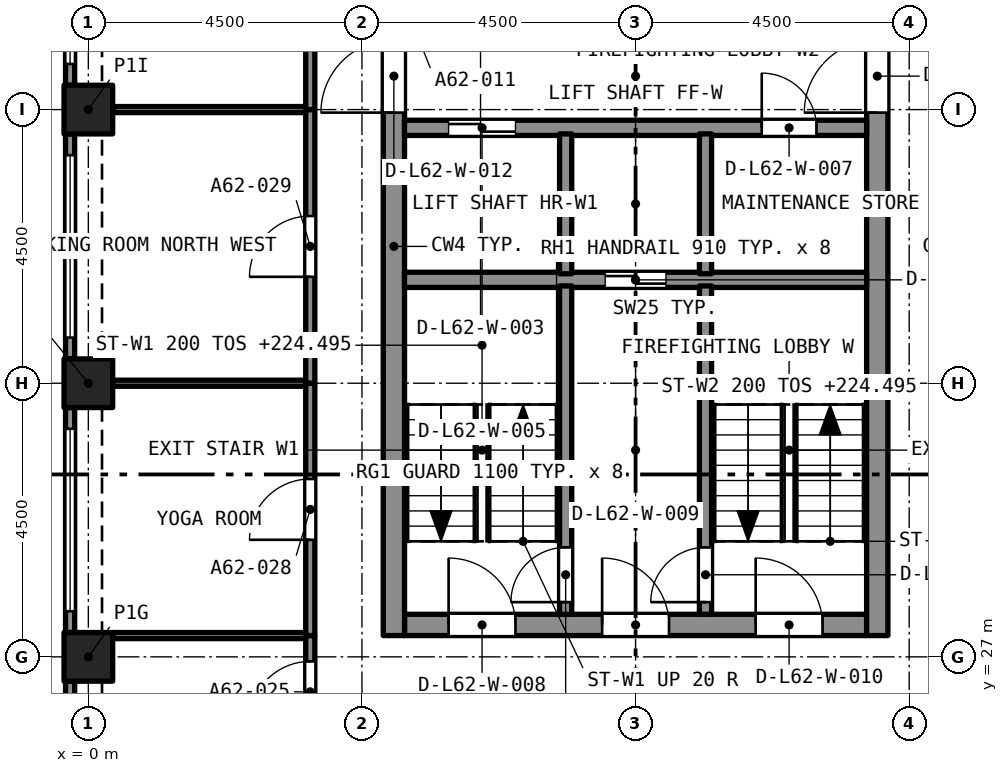
"""IFC4 building model, lengths in metres.
Left out: names, types, materials, properties, quantities, classifications, styles, units other than length and angle.
Written with IfcOpenShell. Run it as: python <this file> out.ifc"""

import sys

from ifc_helpers import new_model, si_unit, direction, frame, frame_2d, origin, origin_2d, place, context, subcontext, project, spatial, rectangle, extrude, element, fill, save


model = new_model("IFC4")
c1 = context("Model", 3, precision=1e-05, world=origin(), true_north=direction((0.0, 1.0)))
c2 = subcontext(c1, "Body", "Model", "MODEL_VIEW")
j1 = project(units=[si_unit("LENGTHUNIT", "METRE"), si_unit("PLANEANGLEUNIT", "RADIAN")], contexts=[c1])
p1 = place(None, origin())
s1 = spatial("IfcSite", under=j1, at=p1, CompositionType="ELEMENT")
p2 = place(p1, origin())
s2 = spatial("IfcBuilding", under=s1, at=p2, CompositionType="ELEMENT")
p3 = place(p2, frame((0.0, 0.0, 222.895)))
s3 = spatial("IfcBuildingStorey", under=s2, at=p3, CompositionType="ELEMENT", Elevation=222.895)
for number, where, z_axis, x_axis in (
    (1, (0.0, 27.0, 0.0), (0.0, 0.0, 1.0), (1.0, 0.0, 0.0)),
    (2, (0.0, 31.5, 0.0), (0.0, 0.0, 1.0), (1.0, 0.0, 0.0)),
    (3, (0.0, 36.0, 0.0), (0.0, 0.0, 1.0), (1.0, 0.0, 0.0)),
):
    element("IfcColumn", number, at=place(p3, frame(where, z_axis=z_axis, x_axis=x_axis)), inside=s3, PredefinedType="COLUMN", context=c2, shape_type="SweptSolid", body=[
        extrude(rectangle(XDim=0.8, YDim=0.8, at=origin_2d()), origin(), (0.0, 0.0, 1.0), 3.2),
    ])
p4 = place(p3, frame((5.2, 27.525, 0.0), z_axis=(0.0, 0.0, 1.0), x_axis=(1.0, 0.0, 0.0)))
e4 = element("IfcWall", 4, at=p4, inside=s3, PredefinedType="SOLIDWALL", context=c2, shape_type="SweptSolid", body=[
    extrude(rectangle(XDim=7.6, YDim=0.35, at=frame_2d((3.8, 0.0))), origin(), (0.0, 0.0, 1.0), 3.2),
])
p5 = place(p4, frame((0.725, 0.0, 0.0)))
e5 = element("IfcOpeningElement", 5, at=p5, cuts=e4, PredefinedType="OPENING", context=c2, shape_type="SweptSolid", body=[
    extrude(rectangle(XDim=1.1, YDim=2.1, at=frame_2d((0.55, 1.05))), frame((0.0, 0.185, 0.0), z_axis=(0.0, -1.0, 0.0), x_axis=(1.0, 0.0, 0.0)), (0.0, 0.0, 1.0), 0.37),
])
p6 = place(p4, frame((3.25, 0.0, 0.0)))
e6 = element("IfcOpeningElement", 6, at=p6, cuts=e4, PredefinedType="OPENING", context=c2, shape_type="SweptSolid", body=[
    extrude(rectangle(XDim=1.1, YDim=2.1, at=frame_2d((0.55, 1.05))), frame((0.0, 0.185, 0.0), z_axis=(0.0, -1.0, 0.0), x_axis=(1.0, 0.0, 0.0)), (0.0, 0.0, 1.0), 0.37),
])
p7 = place(p4, frame((5.775, 0.0, 0.0)))
e7 = element("IfcOpeningElement", 7, at=p7, cuts=e4, PredefinedType="OPENING", context=c2, shape_type="SweptSolid", body=[
    extrude(rectangle(XDim=1.1, YDim=2.1, at=frame_2d((0.55, 1.05))), frame((0.0, 0.185, 0.0), z_axis=(0.0, -1.0, 0.0), x_axis=(1.0, 0.0, 0.0)), (0.0, 0.0, 1.0), 0.37),
])
p8 = place(p3, frame((5.025, 27.35, 0.0), z_axis=(0.0, 0.0, 1.0), x_axis=(0.0, 1.0, 0.0)))
e8 = element("IfcWall", 8, at=p8, inside=s3, PredefinedType="SOLIDWALL", context=c2, shape_type="SweptSolid", body=[
    extrude(rectangle(XDim=12.8, YDim=0.35, at=frame_2d((6.4, 0.0))), origin(), (0.0, 0.0, 1.0), 3.2),
])
p9 = place(p8, frame((8.6, 0.0, 0.0)))
e9 = element("IfcOpeningElement", 9, at=p9, cuts=e8, PredefinedType="OPENING", context=c2, shape_type="SweptSolid", body=[
    extrude(rectangle(XDim=1.2, YDim=2.1, at=frame_2d((0.6, 1.05))), frame((0.0, 0.185, 0.0), z_axis=(0.0, -1.0, 0.0), x_axis=(1.0, 0.0, 0.0)), (0.0, 0.0, 1.0), 0.37),
])
p10 = place(p3, frame((12.975, 27.35, 0.0), z_axis=(0.0, 0.0, 1.0), x_axis=(0.0, 1.0, 0.0)))
e10 = element("IfcWall", 10, at=p10, inside=s3, PredefinedType="SOLIDWALL", context=c2, shape_type="SweptSolid", body=[
    extrude(rectangle(XDim=12.8, YDim=0.35, at=frame_2d((6.4, 0.0))), origin(), (0.0, 0.0, 1.0), 3.2),
])
p11 = place(p10, frame((10.75, 0.0, 0.0)))
e11 = element("IfcOpeningElement", 11, at=p11, cuts=e10, PredefinedType="OPENING", context=c2, shape_type="SweptSolid", body=[
    extrude(rectangle(XDim=1.1, YDim=2.1, at=frame_2d((0.55, 1.05))), frame((0.0, 0.185, 0.0), z_axis=(0.0, -1.0, 0.0), x_axis=(1.0, 0.0, 0.0)), (0.0, 0.0, 1.0), 0.37),
])
p12 = place(p10, frame((8.6, 0.0, 0.0)))
e12 = element("IfcOpeningElement", 12, at=p12, cuts=e10, PredefinedType="OPENING", context=c2, shape_type="SweptSolid", body=[
    extrude(rectangle(XDim=1.2, YDim=2.1, at=frame_2d((0.6, 1.05))), frame((0.0, 0.185, 0.0), z_axis=(0.0, -1.0, 0.0), x_axis=(1.0, 0.0, 0.0)), (0.0, 0.0, 1.0), 0.37),
])
p13 = place(p3, frame((-0.3, 36.4, 0.0), z_axis=(0.0, 0.0, 1.0), x_axis=(0.0, 1.0, 0.0)))
e13 = element("IfcWall", 13, at=p13, inside=s3, PredefinedType="SOLIDWALL", context=c2, shape_type="SweptSolid", body=[
    extrude(rectangle(XDim=3.7, YDim=0.15, at=frame_2d((1.85, 0.0))), origin(), (0.0, 0.0, 1.0), 3.2),
])
p14 = place(p13, frame((0.35, 0.0, 0.45)))
e14 = element("IfcOpeningElement", 14, at=p14, cuts=e13, PredefinedType="OPENING", context=c2, shape_type="SweptSolid", body=[
    extrude(rectangle(XDim=3.0, YDim=1.95, at=frame_2d((1.5, 0.975))), frame((0.0, 0.085, 0.0), z_axis=(0.0, -1.0, 0.0), x_axis=(1.0, 0.0, 0.0)), (0.0, 0.0, 1.0), 0.17),
])
p15 = place(p3, frame((-0.3, 31.9, 0.0), z_axis=(0.0, 0.0, 1.0), x_axis=(0.0, 1.0, 0.0)))
e15 = element("IfcWall", 15, at=p15, inside=s3, PredefinedType="SOLIDWALL", context=c2, shape_type="SweptSolid", body=[
    extrude(rectangle(XDim=3.7, YDim=0.15, at=frame_2d((1.85, 0.0))), origin(), (0.0, 0.0, 1.0), 3.2),
])
p16 = place(p15, frame((0.35, 0.0, 0.45)))
e16 = element("IfcOpeningElement", 16, at=p16, cuts=e15, PredefinedType="OPENING", context=c2, shape_type="SweptSolid", body=[
    extrude(rectangle(XDim=3.0, YDim=1.95, at=frame_2d((1.5, 0.975))), frame((0.0, 0.085, 0.0), z_axis=(0.0, -1.0, 0.0), x_axis=(1.0, 0.0, 0.0)), (0.0, 0.0, 1.0), 0.17),
])
p17 = place(p3, frame((-0.3, 27.4, 0.0), z_axis=(0.0, 0.0, 1.0), x_axis=(0.0, 1.0, 0.0)))
e17 = element("IfcWall", 17, at=p17, inside=s3, PredefinedType="SOLIDWALL", context=c2, shape_type="SweptSolid", body=[
    extrude(rectangle(XDim=3.7, YDim=0.15, at=frame_2d((1.85, 0.0))), origin(), (0.0, 0.0, 1.0), 3.2),
])
p18 = place(p17, frame((0.35, 0.0, 0.45)))
e18 = element("IfcOpeningElement", 18, at=p18, cuts=e17, PredefinedType="OPENING", context=c2, shape_type="SweptSolid", body=[
    extrude(rectangle(XDim=3.0, YDim=1.95, at=frame_2d((1.5, 0.975))), frame((0.0, 0.085, 0.0), z_axis=(0.0, -1.0, 0.0), x_axis=(1.0, 0.0, 0.0)), (0.0, 0.0, 1.0), 0.17),
])
p19 = place(p3, frame((-0.3, 22.9, 0.0), z_axis=(0.0, 0.0, 1.0), x_axis=(0.0, 1.0, 0.0)))
e19 = element("IfcWall", 19, at=p19, inside=s3, PredefinedType="SOLIDWALL", context=c2, shape_type="SweptSolid", body=[
    extrude(rectangle(XDim=3.7, YDim=0.15, at=frame_2d((1.85, 0.0))), origin(), (0.0, 0.0, 1.0), 3.2),
])
p20 = place(p19, frame((0.35, 0.0, 0.45)))
e20 = element("IfcOpeningElement", 20, at=p20, cuts=e19, PredefinedType="OPENING", context=c2, shape_type="SweptSolid", body=[
    extrude(rectangle(XDim=3.0, YDim=1.95, at=frame_2d((1.5, 0.975))), frame((0.0, 0.085, 0.0), z_axis=(0.0, -1.0, 0.0), x_axis=(1.0, 0.0, 0.0)), (0.0, 0.0, 1.0), 0.17),
])
p21 = place(p3, frame((3.65, 25.425, 0.0), z_axis=(0.0, 0.0, 1.0), x_axis=(0.0, 1.0, 0.0)))
e21 = element("IfcWall", 21, at=p21, inside=s3, PredefinedType="PARTITIONING", context=c2, shape_type="SweptSolid", body=[
    extrude(rectangle(XDim=1.925, YDim=0.15, at=frame_2d((0.962, 0.0))), origin(), (0.0, 0.0, 1.0), 2.9),
])
p22 = place(p21, frame((0.5, 0.0, 0.0)))
e22 = element("IfcOpeningElement", 22, at=p22, cuts=e21, PredefinedType="OPENING", context=c2, shape_type="SweptSolid", body=[
    extrude(rectangle(XDim=1.0, YDim=2.1, at=frame_2d((0.5, 1.05))), frame((0.0, 0.085, 0.0), z_axis=(0.0, -1.0, 0.0), x_axis=(1.0, 0.0, 0.0)), (0.0, 0.0, 1.0), 0.17),
])
p23 = place(p3, frame((3.65, 27.35, 0.0), z_axis=(0.0, 0.0, 1.0), x_axis=(0.0, 1.0, 0.0)))
e23 = element("IfcWall", 23, at=p23, inside=s3, PredefinedType="PARTITIONING", context=c2, shape_type="SweptSolid", body=[
    extrude(rectangle(XDim=4.15, YDim=0.15, at=frame_2d((2.075, 0.0))), origin(), (0.0, 0.0, 1.0), 2.9),
])
p24 = place(p23, frame((1.575, 0.0, 0.0)))
e24 = element("IfcOpeningElement", 24, at=p24, cuts=e23, PredefinedType="OPENING", context=c2, shape_type="SweptSolid", body=[
    extrude(rectangle(XDim=1.0, YDim=2.1, at=frame_2d((0.5, 1.05))), frame((0.0, 0.085, 0.0), z_axis=(0.0, -1.0, 0.0), x_axis=(1.0, 0.0, 0.0)), (0.0, 0.0, 1.0), 0.17),
])
p25 = place(p3, frame((3.65, 31.5, 0.0), z_axis=(0.0, 0.0, 1.0), x_axis=(0.0, 1.0, 0.0)))
e25 = element("IfcWall", 25, at=p25, inside=s3, PredefinedType="PARTITIONING", context=c2, shape_type="SweptSolid", body=[
    extrude(rectangle(XDim=4.5, YDim=0.15, at=frame_2d((2.25, 0.0))), origin(), (0.0, 0.0, 1.0), 2.9),
])
p26 = place(p25, frame((1.75, 0.0, 0.0)))
e26 = element("IfcOpeningElement", 26, at=p26, cuts=e25, PredefinedType="OPENING", context=c2, shape_type="SweptSolid", body=[
    extrude(rectangle(XDim=1.0, YDim=2.1, at=frame_2d((0.5, 1.05))), frame((0.0, 0.085, 0.0), z_axis=(0.0, -1.0, 0.0), x_axis=(1.0, 0.0, 0.0)), (0.0, 0.0, 1.0), 0.17),
])
p27 = place(p3, frame((3.65, 36.0, 0.0), z_axis=(0.0, 0.0, 1.0), x_axis=(0.0, 1.0, 0.0)))
e27 = element("IfcWall", 27, at=p27, inside=s3, PredefinedType="PARTITIONING", context=c2, shape_type="SweptSolid", body=[
    extrude(rectangle(XDim=4.025, YDim=0.15, at=frame_2d((2.012, 0.0))), origin(), (0.0, 0.0, 1.0), 2.9),
])
p28 = place(p27, frame((1.575, 0.0, 0.0)))
e28 = element("IfcOpeningElement", 28, at=p28, cuts=e27, PredefinedType="OPENING", context=c2, shape_type="SweptSolid", body=[
    extrude(rectangle(XDim=1.0, YDim=2.1, at=frame_2d((0.5, 1.05))), frame((0.0, 0.085, 0.0), z_axis=(0.0, -1.0, 0.0), x_axis=(1.0, 0.0, 0.0)), (0.0, 0.0, 1.0), 0.17),
])
for number, where, z_axis, x_axis in (
    (29, (0.4, 27.35, 0.0), (0.0, 0.0, 1.0), (1.0, 0.0, 0.0)),
    (30, (0.4, 31.5, 0.0), (0.0, 0.0, 1.0), (1.0, 0.0, 0.0)),
    (31, (0.4, 36.0, 0.0), (0.0, 0.0, 1.0), (1.0, 0.0, 0.0)),
):
    element("IfcWall", number, at=place(p3, frame(where, z_axis=z_axis, x_axis=x_axis)), inside=s3, PredefinedType="PARTITIONING", context=c2, shape_type="SweptSolid", body=[
        extrude(rectangle(XDim=3.175, YDim=0.1, at=frame_2d((1.587, 0.0))), origin(), (0.0, 0.0, 1.0), 2.9),
    ])
p29 = place(p3, frame((5.2, 33.2, 0.0), z_axis=(0.0, 0.0, 1.0), x_axis=(1.0, 0.0, 0.0)))
e32 = element("IfcWall", 32, at=p29, inside=s3, PredefinedType="SOLIDWALL", context=c2, shape_type="SweptSolid", body=[
    extrude(rectangle(XDim=7.6, YDim=0.25, at=frame_2d((3.8, 0.0))), origin(), (0.0, 0.0, 1.0), 2.9),
])
p30 = place(p29, frame((3.3, 0.0, 0.0)))
e33 = element("IfcOpeningElement", 33, at=p30, cuts=e32, PredefinedType="OPENING", context=c2, shape_type="SweptSolid", body=[
    extrude(rectangle(XDim=1.0, YDim=2.1, at=frame_2d((0.5, 1.05))), frame((0.0, 0.135, 0.0), z_axis=(0.0, -1.0, 0.0), x_axis=(1.0, 0.0, 0.0)), (0.0, 0.0, 1.0), 0.27),
])
p31 = place(p3, frame((5.2, 35.7, 0.0), z_axis=(0.0, 0.0, 1.0), x_axis=(1.0, 0.0, 0.0)))
e34 = element("IfcWall", 34, at=p31, inside=s3, PredefinedType="SOLIDWALL", context=c2, shape_type="SweptSolid", body=[
    extrude(rectangle(XDim=7.6, YDim=0.25, at=frame_2d((3.8, 0.0))), origin(), (0.0, 0.0, 1.0), 2.9),
])
p32 = place(p31, frame((0.725, 0.0, 0.0)))
e35 = element("IfcOpeningElement", 35, at=p32, cuts=e34, PredefinedType="OPENING", context=c2, shape_type="SweptSolid", body=[
    extrude(rectangle(XDim=1.1, YDim=2.4, at=frame_2d((0.55, 1.2))), frame((0.0, 0.135, 0.0), z_axis=(0.0, -1.0, 0.0), x_axis=(1.0, 0.0, 0.0)), (0.0, 0.0, 1.0), 0.27),
])
p33 = place(p31, frame((5.875, 0.0, 0.0)))
e36 = element("IfcOpeningElement", 36, at=p33, cuts=e34, PredefinedType="OPENING", context=c2, shape_type="SweptSolid", body=[
    extrude(rectangle(XDim=0.9, YDim=2.1, at=frame_2d((0.45, 1.05))), frame((0.0, 0.135, 0.0), z_axis=(0.0, -1.0, 0.0), x_axis=(1.0, 0.0, 0.0)), (0.0, 0.0, 1.0), 0.27),
])
p34 = place(p3, frame((7.85, 27.7, 0.0), z_axis=(0.0, 0.0, 1.0), x_axis=(0.0, 1.0, 0.0)))
e37 = element("IfcWall", 37, at=p34, inside=s3, PredefinedType="SOLIDWALL", context=c2, shape_type="SweptSolid", body=[
    extrude(rectangle(XDim=5.4, YDim=0.2, at=frame_2d((2.7, 0.0))), origin(), (0.0, 0.0, 1.0), 2.9),
])
p35 = place(p34, frame((0.2, 0.0, 0.0)))
e38 = element("IfcOpeningElement", 38, at=p35, cuts=e37, PredefinedType="OPENING", context=c2, shape_type="SweptSolid", body=[
    extrude(rectangle(XDim=0.9, YDim=2.1, at=frame_2d((0.45, 1.05))), frame((0.0, 0.11, 0.0), z_axis=(0.0, -1.0, 0.0), x_axis=(1.0, 0.0, 0.0)), (0.0, 0.0, 1.0), 0.22),
])
p36 = place(p3, frame((10.15, 27.7, 0.0), z_axis=(0.0, 0.0, 1.0), x_axis=(0.0, 1.0, 0.0)))
e39 = element("IfcWall", 39, at=p36, inside=s3, PredefinedType="SOLIDWALL", context=c2, shape_type="SweptSolid", body=[
    extrude(rectangle(XDim=5.4, YDim=0.2, at=frame_2d((2.7, 0.0))), origin(), (0.0, 0.0, 1.0), 2.9),
])
p37 = place(p36, frame((0.2, 0.0, 0.0)))
e40 = element("IfcOpeningElement", 40, at=p37, cuts=e39, PredefinedType="OPENING", context=c2, shape_type="SweptSolid", body=[
    extrude(rectangle(XDim=0.9, YDim=2.1, at=frame_2d((0.45, 1.05))), frame((0.0, 0.11, 0.0), z_axis=(0.0, -1.0, 0.0), x_axis=(1.0, 0.0, 0.0)), (0.0, 0.0, 1.0), 0.22),
])
for number, where, z_axis, x_axis in (
    (41, (7.85, 33.3, 0.0), (0.0, 0.0, 1.0), (0.0, 1.0, 0.0)),
    (42, (10.15, 33.3, 0.0), (0.0, 0.0, 1.0), (0.0, 1.0, 0.0)),
):
    element("IfcWall", number, at=place(p3, frame(where, z_axis=z_axis, x_axis=x_axis)), inside=s3, PredefinedType="SOLIDWALL", context=c2, shape_type="SweptSolid", body=[
        extrude(rectangle(XDim=2.3, YDim=0.2, at=frame_2d((1.15, 0.0))), origin(), (0.0, 0.0, 1.0), 2.9),
    ])
p38 = place(p14, origin())
e43 = element("IfcWindow", 43, at=p38, inside=s3, PartitioningType="SINGLE_PANEL", PredefinedType="WINDOW", context=c2, shape_type="SweptSolid", body=[
    extrude(rectangle(XDim=3.0, YDim=1.95, at=frame_2d((1.5, 0.975))), frame((0.0, 0.03, 0.0), z_axis=(0.0, -1.0, 0.0), x_axis=(1.0, 0.0, 0.0)), (0.0, 0.0, 1.0), 0.06),
])
fill(e14, e43)
p39 = place(p16, origin())
e44 = element("IfcWindow", 44, at=p39, inside=s3, PartitioningType="SINGLE_PANEL", PredefinedType="WINDOW", context=c2, shape_type="SweptSolid", body=[
    extrude(rectangle(XDim=3.0, YDim=1.95, at=frame_2d((1.5, 0.975))), frame((0.0, 0.03, 0.0), z_axis=(0.0, -1.0, 0.0), x_axis=(1.0, 0.0, 0.0)), (0.0, 0.0, 1.0), 0.06),
])
fill(e16, e44)
p40 = place(p18, origin())
e45 = element("IfcWindow", 45, at=p40, inside=s3, PartitioningType="SINGLE_PANEL", PredefinedType="WINDOW", context=c2, shape_type="SweptSolid", body=[
    extrude(rectangle(XDim=3.0, YDim=1.95, at=frame_2d((1.5, 0.975))), frame((0.0, 0.03, 0.0), z_axis=(0.0, -1.0, 0.0), x_axis=(1.0, 0.0, 0.0)), (0.0, 0.0, 1.0), 0.06),
])
fill(e18, e45)
p41 = place(p22, origin())
e46 = element("IfcDoor", 46, at=p41, inside=s3, OperationType="SINGLE_SWING_RIGHT", PredefinedType="DOOR", context=c2, shape_type="SweptSolid", body=[
    extrude(rectangle(XDim=1.0, YDim=2.1, at=frame_2d((0.5, 1.05))), frame((0.0, 0.025, 0.0), z_axis=(0.0, -1.0, 0.0), x_axis=(1.0, 0.0, 0.0)), (0.0, 0.0, 1.0), 0.05),
])
fill(e22, e46)
p42 = place(p24, origin())
e47 = element("IfcDoor", 47, at=p42, inside=s3, OperationType="SINGLE_SWING_RIGHT", PredefinedType="DOOR", context=c2, shape_type="SweptSolid", body=[
    extrude(rectangle(XDim=1.0, YDim=2.1, at=frame_2d((0.5, 1.05))), frame((0.0, 0.025, 0.0), z_axis=(0.0, -1.0, 0.0), x_axis=(1.0, 0.0, 0.0)), (0.0, 0.0, 1.0), 0.05),
])
fill(e24, e47)
p43 = place(p26, origin())
e48 = element("IfcDoor", 48, at=p43, inside=s3, OperationType="SINGLE_SWING_RIGHT", PredefinedType="DOOR", context=c2, shape_type="SweptSolid", body=[
    extrude(rectangle(XDim=1.0, YDim=2.1, at=frame_2d((0.5, 1.05))), frame((0.0, 0.025, 0.0), z_axis=(0.0, -1.0, 0.0), x_axis=(1.0, 0.0, 0.0)), (0.0, 0.0, 1.0), 0.05),
])
fill(e26, e48)
p44 = place(p35, origin())
e49 = element("IfcDoor", 49, at=p44, inside=s3, OperationType="SINGLE_SWING_LEFT", PredefinedType="DOOR", context=c2, shape_type="SweptSolid", body=[
    extrude(rectangle(XDim=0.9, YDim=2.1, at=frame_2d((0.45, 1.05))), frame((0.0, 0.025, 0.0), z_axis=(0.0, -1.0, 0.0), x_axis=(1.0, 0.0, 0.0)), (0.0, 0.0, 1.0), 0.05),
])
fill(e38, e49)
p45 = place(p37, origin())
e50 = element("IfcDoor", 50, at=p45, inside=s3, OperationType="SINGLE_SWING_LEFT", PredefinedType="DOOR", context=c2, shape_type="SweptSolid", body=[
    extrude(rectangle(XDim=0.9, YDim=2.1, at=frame_2d((0.45, 1.05))), frame((0.0, 0.025, 0.0), z_axis=(0.0, -1.0, 0.0), x_axis=(1.0, 0.0, 0.0)), (0.0, 0.0, 1.0), 0.05),
])
fill(e40, e50)
p46 = place(p32, origin())
e51 = element("IfcDoor", 51, at=p46, inside=s3, OperationType="SLIDING_TO_LEFT", PredefinedType="DOOR", context=c2, shape_type="SweptSolid", body=[
    extrude(rectangle(XDim=1.1, YDim=2.4, at=frame_2d((0.55, 1.2))), frame((0.0, 0.025, 0.0), z_axis=(0.0, -1.0, 0.0), x_axis=(1.0, 0.0, 0.0)), (0.0, 0.0, 1.0), 0.05),
])
fill(e35, e51)
p47 = place(p30, origin())
e52 = element("IfcDoor", 52, at=p47, inside=s3, OperationType="SLIDING_TO_LEFT", PredefinedType="DOOR", context=c2, shape_type="SweptSolid", body=[
    extrude(rectangle(XDim=1.0, YDim=2.1, at=frame_2d((0.5, 1.05))), frame((0.0, 0.025, 0.0), z_axis=(0.0, -1.0, 0.0), x_axis=(1.0, 0.0, 0.0)), (0.0, 0.0, 1.0), 0.05),
])
fill(e33, e52)
p48 = place(p33, origin())
e53 = element("IfcDoor", 53, at=p48, inside=s3, OperationType="SINGLE_SWING_LEFT", PredefinedType="DOOR", context=c2, shape_type="SweptSolid", body=[
    extrude(rectangle(XDim=0.9, YDim=2.1, at=frame_2d((0.45, 1.05))), frame((0.0, 0.025, 0.0), z_axis=(0.0, -1.0, 0.0), x_axis=(1.0, 0.0, 0.0)), (0.0, 0.0, 1.0), 0.05),
])
fill(e36, e53)
p49 = place(p5, origin())
e54 = element("IfcDoor", 54, at=p49, inside=s3, OperationType="SINGLE_SWING_LEFT", PredefinedType="DOOR", context=c2, shape_type="SweptSolid", body=[
    extrude(rectangle(XDim=1.1, YDim=2.1, at=frame_2d((0.55, 1.05))), frame((0.0, 0.025, 0.0), z_axis=(0.0, -1.0, 0.0), x_axis=(1.0, 0.0, 0.0)), (0.0, 0.0, 1.0), 0.05),
])
fill(e5, e54)
p50 = place(p6, origin())
e55 = element("IfcDoor", 55, at=p50, inside=s3, OperationType="SINGLE_SWING_LEFT", PredefinedType="DOOR", context=c2, shape_type="SweptSolid", body=[
    extrude(rectangle(XDim=1.1, YDim=2.1, at=frame_2d((0.55, 1.05))), frame((0.0, 0.025, 0.0), z_axis=(0.0, -1.0, 0.0), x_axis=(1.0, 0.0, 0.0)), (0.0, 0.0, 1.0), 0.05),
])
fill(e6, e55)
p51 = place(p7, origin())
e56 = element("IfcDoor", 56, at=p51, inside=s3, OperationType="SINGLE_SWING_LEFT", PredefinedType="DOOR", context=c2, shape_type="SweptSolid", body=[
    extrude(rectangle(XDim=1.1, YDim=2.1, at=frame_2d((0.55, 1.05))), frame((0.0, 0.025, 0.0), z_axis=(0.0, -1.0, 0.0), x_axis=(1.0, 0.0, 0.0)), (0.0, 0.0, 1.0), 0.05),
])
fill(e7, e56)
p52 = place(p9, origin())
e57 = element("IfcDoor", 57, at=p52, inside=s3, OperationType="SINGLE_SWING_LEFT", PredefinedType="DOOR", context=c2, shape_type="SweptSolid", body=[
    extrude(rectangle(XDim=1.2, YDim=2.1, at=frame_2d((0.6, 1.05))), frame((0.0, 0.025, 0.0), z_axis=(0.0, -1.0, 0.0), x_axis=(1.0, 0.0, 0.0)), (0.0, 0.0, 1.0), 0.05),
])
fill(e9, e57)
p53 = place(p12, origin())
e58 = element("IfcDoor", 58, at=p53, inside=s3, OperationType="SINGLE_SWING_LEFT", PredefinedType="DOOR", context=c2, shape_type="SweptSolid", body=[
    extrude(rectangle(XDim=1.2, YDim=2.1, at=frame_2d((0.6, 1.05))), frame((0.0, 0.025, 0.0), z_axis=(0.0, -1.0, 0.0), x_axis=(1.0, 0.0, 0.0)), (0.0, 0.0, 1.0), 0.05),
])
fill(e12, e58)
save(model, sys.argv[1])
